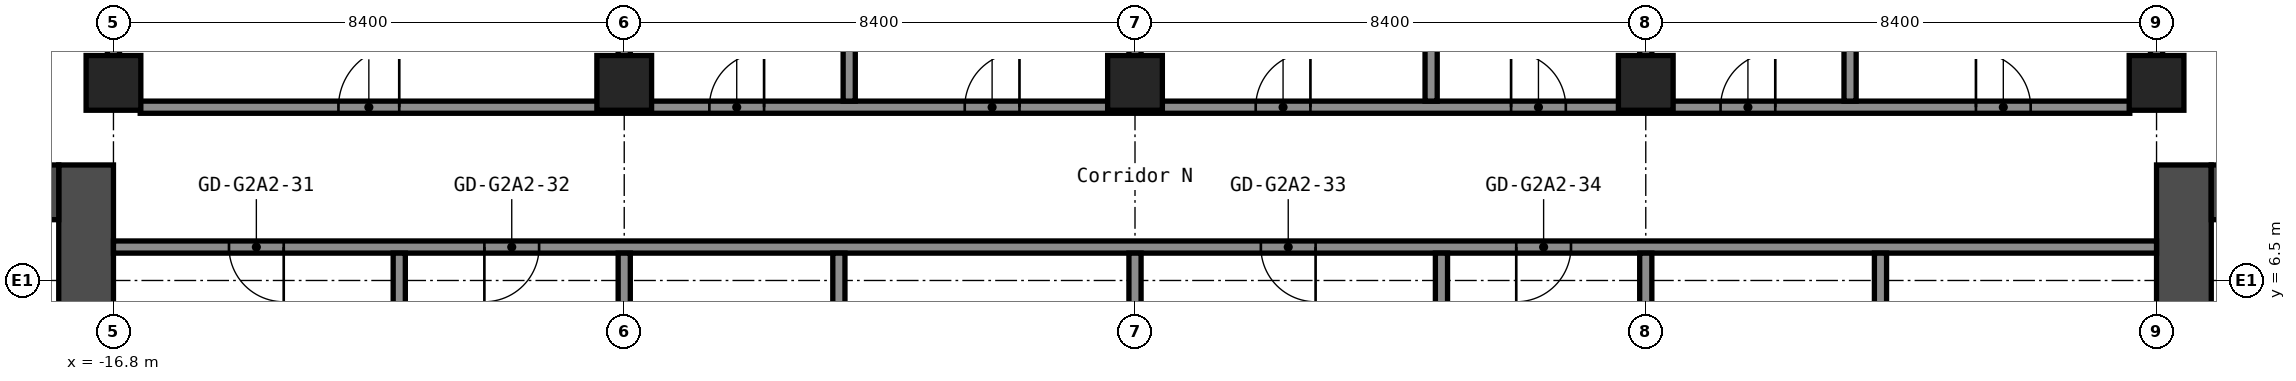
"""IFC4 building model, lengths in metres.
Left out: names, types, materials, properties, quantities, classifications, styles, units other than length and angle.
Written with IfcOpenShell. Run it as: python <this file> out.ifc"""

import sys

from ifc_helpers import new_model, si_unit, direction, frame, frame_2d, origin, origin_2d, place, context, subcontext, project, spatial, rectangle, hollow_rectangle, extrude, element, fill, save


model = new_model("IFC4")
c1 = context("Model", 3, precision=1e-05, world=origin(), true_north=direction((0.0, 1.0)))
c2 = subcontext(c1, "Body", "Model", "MODEL_VIEW")
j1 = project(units=[si_unit("LENGTHUNIT", "METRE"), si_unit("PLANEANGLEUNIT", "RADIAN")], contexts=[c1])
p1 = place(None, origin())
s1 = spatial("IfcSite", under=j1, at=p1, CompositionType="ELEMENT")
p2 = place(p1, origin())
s2 = spatial("IfcBuilding", under=s1, at=p2, CompositionType="ELEMENT")
p3 = place(p2, frame((0.0, 0.0, 107.4)))
s3 = spatial("IfcBuildingStorey", under=s2, at=p3, CompositionType="ELEMENT", Elevation=107.4)
for number, where, z_axis, x_axis in (
    (1, (-16.8, 9.75, 0.0), (0.0, 0.0, 1.0), (1.0, 0.0, 0.0)),
    (2, (-8.4, 9.75, 0.0), (0.0, 0.0, 1.0), (1.0, 0.0, 0.0)),
    (3, (0.0, 9.75, 0.0), (0.0, 0.0, 1.0), (1.0, 0.0, 0.0)),
    (4, (8.4, 9.75, 0.0), (0.0, 0.0, 1.0), (1.0, 0.0, 0.0)),
    (5, (16.8, 9.75, 0.0), (0.0, 0.0, 1.0), (1.0, 0.0, 0.0)),
):
    element("IfcColumn", number, at=place(p3, frame(where, z_axis=z_axis, x_axis=x_axis)), inside=s3, PredefinedType="COLUMN", context=c2, shape_type="SweptSolid", body=[
        extrude(hollow_rectangle(XDim=0.9, YDim=0.9, WallThickness=0.036, at=origin_2d()), origin(), (0.0, 0.0, 1.0), 2.8),
    ])
p4 = place(p3, frame((-17.25, -8.4, 0.0), z_axis=(0.0, 0.0, 1.0), x_axis=(0.0, 1.0, 0.0)))
e6 = element("IfcWall", 6, at=p4, inside=s3, PredefinedType="SHEAR", context=c2, shape_type="SweptSolid", body=[
    extrude(rectangle(XDim=16.8, YDim=0.9, at=frame_2d((8.4, 0.0))), origin(), (0.0, 0.0, 1.0), 2.8),
])
p5 = place(p4, frame((7.6, 0.0, 0.0)))
e7 = element("IfcOpeningElement", 7, at=p5, cuts=e6, PredefinedType="OPENING", context=c2, shape_type="SweptSolid", body=[
    extrude(rectangle(XDim=1.2, YDim=2.1, at=frame_2d((0.6, 1.05))), frame((0.0, 0.46, 0.0), z_axis=(0.0, -1.0, 0.0), x_axis=(1.0, 0.0, 0.0)), (0.0, 0.0, 1.0), 0.92),
])
p6 = place(p3, frame((-32.7, 7.95, 0.0), z_axis=(0.0, 0.0, 1.0), x_axis=(1.0, 0.0, 0.0)))
e8 = element("IfcWall", 8, at=p6, inside=s3, PredefinedType="SHEAR", context=c2, shape_type="SweptSolid", body=[
    extrude(rectangle(XDim=15.0, YDim=0.9, at=frame_2d((7.5, 0.0))), origin(), (0.0, 0.0, 1.0), 2.8),
])
p7 = place(p6, frame((3.4, 0.0, 0.0)))
e9 = element("IfcOpeningElement", 9, at=p7, cuts=e8, PredefinedType="OPENING", context=c2, shape_type="SweptSolid", body=[
    extrude(rectangle(XDim=1.2, YDim=2.1, at=frame_2d((0.6, 1.05))), frame((0.0, 0.46, 0.0), z_axis=(0.0, -1.0, 0.0), x_axis=(1.0, 0.0, 0.0)), (0.0, 0.0, 1.0), 0.92),
])
p8 = place(p6, frame((0.75, 0.0, 0.0)))
e10 = element("IfcOpeningElement", 10, at=p8, cuts=e8, PredefinedType="OPENING", context=c2, shape_type="SweptSolid", body=[
    extrude(rectangle(XDim=0.9, YDim=2.1, at=frame_2d((0.45, 1.05))), frame((0.0, 0.46, 0.0), z_axis=(0.0, -1.0, 0.0), x_axis=(1.0, 0.0, 0.0)), (0.0, 0.0, 1.0), 0.92),
])
p9 = place(p3, frame((17.25, -8.4, 0.0), z_axis=(0.0, 0.0, 1.0), x_axis=(0.0, 1.0, 0.0)))
e11 = element("IfcWall", 11, at=p9, inside=s3, PredefinedType="SHEAR", context=c2, shape_type="SweptSolid", body=[
    extrude(rectangle(XDim=16.8, YDim=0.9, at=frame_2d((8.4, 0.0))), origin(), (0.0, 0.0, 1.0), 2.8),
])
p10 = place(p9, frame((7.6, 0.0, 0.0)))
e12 = element("IfcOpeningElement", 12, at=p10, cuts=e11, PredefinedType="OPENING", context=c2, shape_type="SweptSolid", body=[
    extrude(rectangle(XDim=1.2, YDim=2.1, at=frame_2d((0.6, 1.05))), frame((0.0, 0.46, 0.0), z_axis=(0.0, -1.0, 0.0), x_axis=(1.0, 0.0, 0.0)), (0.0, 0.0, 1.0), 0.92),
])
p11 = place(p3, frame((17.7, 7.95, 0.0), z_axis=(0.0, 0.0, 1.0), x_axis=(1.0, 0.0, 0.0)))
e13 = element("IfcWall", 13, at=p11, inside=s3, PredefinedType="SHEAR", context=c2, shape_type="SweptSolid", body=[
    extrude(rectangle(XDim=15.0, YDim=0.9, at=frame_2d((7.5, 0.0))), origin(), (0.0, 0.0, 1.0), 2.8),
])
p12 = place(p11, frame((10.4, 0.0, 0.0)))
e14 = element("IfcOpeningElement", 14, at=p12, cuts=e13, PredefinedType="OPENING", context=c2, shape_type="SweptSolid", body=[
    extrude(rectangle(XDim=1.2, YDim=2.1, at=frame_2d((0.6, 1.05))), frame((0.0, 0.46, 0.0), z_axis=(0.0, -1.0, 0.0), x_axis=(1.0, 0.0, 0.0)), (0.0, 0.0, 1.0), 0.92),
])
p13 = place(p11, frame((13.35, 0.0, 0.0)))
e15 = element("IfcOpeningElement", 15, at=p13, cuts=e13, PredefinedType="OPENING", context=c2, shape_type="SweptSolid", body=[
    extrude(rectangle(XDim=0.9, YDim=2.1, at=frame_2d((0.45, 1.05))), frame((0.0, 0.46, 0.0), z_axis=(0.0, -1.0, 0.0), x_axis=(1.0, 0.0, 0.0)), (0.0, 0.0, 1.0), 0.92),
])
p14 = place(p3, frame((-16.8, 7.05, 0.0), z_axis=(0.0, 0.0, 1.0), x_axis=(1.0, 0.0, 0.0)))
e16 = element("IfcWall", 16, at=p14, inside=s3, PredefinedType="PARTITIONING", context=c2, shape_type="SweptSolid", body=[
    extrude(rectangle(XDim=33.6, YDim=0.2, at=frame_2d((16.8, 0.0))), origin(), (0.0, 0.0, 1.0), 2.8),
])
p15 = place(p14, frame((1.9, 0.0, 0.0)))
e17 = element("IfcOpeningElement", 17, at=p15, cuts=e16, PredefinedType="OPENING", context=c2, shape_type="SweptSolid", body=[
    extrude(rectangle(XDim=0.9, YDim=2.1, at=frame_2d((0.45, 1.05))), frame((0.0, 0.11, 0.0), z_axis=(0.0, -1.0, 0.0), x_axis=(1.0, 0.0, 0.0)), (0.0, 0.0, 1.0), 0.22),
])
p16 = place(p14, frame((6.1, 0.0, 0.0)))
e18 = element("IfcOpeningElement", 18, at=p16, cuts=e16, PredefinedType="OPENING", context=c2, shape_type="SweptSolid", body=[
    extrude(rectangle(XDim=0.9, YDim=2.1, at=frame_2d((0.45, 1.05))), frame((0.0, 0.11, 0.0), z_axis=(0.0, -1.0, 0.0), x_axis=(1.0, 0.0, 0.0)), (0.0, 0.0, 1.0), 0.22),
])
p17 = place(p14, frame((18.87, 0.0, 0.0)))
e19 = element("IfcOpeningElement", 19, at=p17, cuts=e16, PredefinedType="OPENING", context=c2, shape_type="SweptSolid", body=[
    extrude(rectangle(XDim=0.9, YDim=2.1, at=frame_2d((0.45, 1.05))), frame((0.0, 0.11, 0.0), z_axis=(0.0, -1.0, 0.0), x_axis=(1.0, 0.0, 0.0)), (0.0, 0.0, 1.0), 0.22),
])
p18 = place(p14, frame((23.07, 0.0, 0.0)))
e20 = element("IfcOpeningElement", 20, at=p18, cuts=e16, PredefinedType="OPENING", context=c2, shape_type="SweptSolid", body=[
    extrude(rectangle(XDim=0.9, YDim=2.1, at=frame_2d((0.45, 1.05))), frame((0.0, 0.11, 0.0), z_axis=(0.0, -1.0, 0.0), x_axis=(1.0, 0.0, 0.0)), (0.0, 0.0, 1.0), 0.22),
])
p19 = place(p3, frame((-16.36, 9.35, 0.0), z_axis=(0.0, 0.0, 1.0), x_axis=(1.0, 0.0, 0.0)))
e21 = element("IfcWall", 21, at=p19, inside=s3, PredefinedType="PARTITIONING", context=c2, shape_type="SweptSolid", body=[
    extrude(rectangle(XDim=32.72, YDim=0.2, at=frame_2d((16.36, 0.0))), origin(), (0.0, 0.0, 1.0), 2.8),
])
p20 = place(p19, frame((3.26, 0.0, 0.0)))
e22 = element("IfcOpeningElement", 22, at=p20, cuts=e21, PredefinedType="OPENING", context=c2, shape_type="SweptSolid", body=[
    extrude(rectangle(XDim=1.0, YDim=2.1, at=frame_2d((0.5, 1.05))), frame((0.0, 0.11, 0.0), z_axis=(0.0, -1.0, 0.0), x_axis=(1.0, 0.0, 0.0)), (0.0, 0.0, 1.0), 0.22),
])
p21 = place(p19, frame((9.36, 0.0, 0.0)))
e23 = element("IfcOpeningElement", 23, at=p21, cuts=e21, PredefinedType="OPENING", context=c2, shape_type="SweptSolid", body=[
    extrude(rectangle(XDim=0.9, YDim=2.1, at=frame_2d((0.45, 1.05))), frame((0.0, 0.11, 0.0), z_axis=(0.0, -1.0, 0.0), x_axis=(1.0, 0.0, 0.0)), (0.0, 0.0, 1.0), 0.22),
])
p22 = place(p19, frame((13.56, 0.0, 0.0)))
e24 = element("IfcOpeningElement", 24, at=p22, cuts=e21, PredefinedType="OPENING", context=c2, shape_type="SweptSolid", body=[
    extrude(rectangle(XDim=0.9, YDim=2.1, at=frame_2d((0.45, 1.05))), frame((0.0, 0.11, 0.0), z_axis=(0.0, -1.0, 0.0), x_axis=(1.0, 0.0, 0.0)), (0.0, 0.0, 1.0), 0.22),
])
p23 = place(p19, frame((18.345, 0.0, 0.0)))
e25 = element("IfcOpeningElement", 25, at=p23, cuts=e21, PredefinedType="OPENING", context=c2, shape_type="SweptSolid", body=[
    extrude(rectangle(XDim=0.9, YDim=2.1, at=frame_2d((0.45, 1.05))), frame((0.0, 0.11, 0.0), z_axis=(0.0, -1.0, 0.0), x_axis=(1.0, 0.0, 0.0)), (0.0, 0.0, 1.0), 0.22),
])
p24 = place(p19, frame((22.545, 0.0, 0.0)))
e26 = element("IfcOpeningElement", 26, at=p24, cuts=e21, PredefinedType="OPENING", context=c2, shape_type="SweptSolid", body=[
    extrude(rectangle(XDim=0.9, YDim=2.1, at=frame_2d((0.45, 1.05))), frame((0.0, 0.11, 0.0), z_axis=(0.0, -1.0, 0.0), x_axis=(1.0, 0.0, 0.0)), (0.0, 0.0, 1.0), 0.22),
])
p25 = place(p19, frame((25.99, 0.0, 0.0)))
e27 = element("IfcOpeningElement", 27, at=p25, cuts=e21, PredefinedType="OPENING", context=c2, shape_type="SweptSolid", body=[
    extrude(rectangle(XDim=0.9, YDim=2.1, at=frame_2d((0.45, 1.05))), frame((0.0, 0.11, 0.0), z_axis=(0.0, -1.0, 0.0), x_axis=(1.0, 0.0, 0.0)), (0.0, 0.0, 1.0), 0.22),
])
p26 = place(p19, frame((30.19, 0.0, 0.0)))
e28 = element("IfcOpeningElement", 28, at=p26, cuts=e21, PredefinedType="OPENING", context=c2, shape_type="SweptSolid", body=[
    extrude(rectangle(XDim=0.9, YDim=2.1, at=frame_2d((0.45, 1.05))), frame((0.0, 0.11, 0.0), z_axis=(0.0, -1.0, 0.0), x_axis=(1.0, 0.0, 0.0)), (0.0, 0.0, 1.0), 0.22),
])
p27 = place(p3, frame((-16.8, 10.19, 0.0), z_axis=(0.0, 0.0, 1.0), x_axis=(0.0, 1.0, 0.0)))
e29 = element("IfcWall", 29, at=p27, inside=s3, PredefinedType="PARTITIONING", context=c2, shape_type="SweptSolid", body=[
    extrude(rectangle(XDim=13.36, YDim=0.2, at=frame_2d((6.68, 0.0))), origin(), (0.0, 0.0, 1.0), 2.8),
])
for number, where, z_axis, x_axis in (
    (30, (-12.1, 1.05, 0.0), (0.0, 0.0, 1.0), (0.0, 1.0, 0.0)),
    (31, (-8.4, 1.05, 0.0), (0.0, 0.0, 1.0), (0.0, 1.0, 0.0)),
):
    element("IfcWall", number, at=place(p3, frame(where, z_axis=z_axis, x_axis=x_axis)), inside=s3, PredefinedType="PARTITIONING", context=c2, shape_type="SweptSolid", body=[
        extrude(rectangle(XDim=5.9, YDim=0.2, at=frame_2d((2.95, 0.0))), origin(), (0.0, 0.0, 1.0), 2.8),
    ])
p28 = place(p3, frame((-8.4, 10.19, 0.0), z_axis=(0.0, 0.0, 1.0), x_axis=(0.0, 1.0, 0.0)))
e32 = element("IfcWall", 32, at=p28, inside=s3, PredefinedType="PARTITIONING", context=c2, shape_type="SweptSolid", body=[
    extrude(rectangle(XDim=13.36, YDim=0.2, at=frame_2d((6.68, 0.0))), origin(), (0.0, 0.0, 1.0), 2.8),
])
p29 = place(p3, frame((-4.87, 1.05, 0.0), z_axis=(0.0, 0.0, 1.0), x_axis=(0.0, 1.0, 0.0)))
e33 = element("IfcWall", 33, at=p29, inside=s3, PredefinedType="PARTITIONING", context=c2, shape_type="SweptSolid", body=[
    extrude(rectangle(XDim=5.9, YDim=0.2, at=frame_2d((2.95, 0.0))), origin(), (0.0, 0.0, 1.0), 2.8),
])
p30 = place(p3, frame((-4.7, 9.45, 0.0), z_axis=(0.0, 0.0, 1.0), x_axis=(0.0, 1.0, 0.0)))
e34 = element("IfcWall", 34, at=p30, inside=s3, PredefinedType="PARTITIONING", context=c2, shape_type="SweptSolid", body=[
    extrude(rectangle(XDim=14.1, YDim=0.2, at=frame_2d((7.05, 0.0))), origin(), (0.0, 0.0, 1.0), 2.8),
])
p31 = place(p3, frame((0.0, 1.05, 0.0), z_axis=(0.0, 0.0, 1.0), x_axis=(0.0, 1.0, 0.0)))
e35 = element("IfcWall", 35, at=p31, inside=s3, PredefinedType="PARTITIONING", context=c2, shape_type="SweptSolid", body=[
    extrude(rectangle(XDim=5.9, YDim=0.2, at=frame_2d((2.95, 0.0))), origin(), (0.0, 0.0, 1.0), 2.8),
])
p32 = place(p3, frame((0.0, 10.19, 0.0), z_axis=(0.0, 0.0, 1.0), x_axis=(0.0, 1.0, 0.0)))
e36 = element("IfcWall", 36, at=p32, inside=s3, PredefinedType="PARTITIONING", context=c2, shape_type="SweptSolid", body=[
    extrude(rectangle(XDim=13.36, YDim=0.2, at=frame_2d((6.68, 0.0))), origin(), (0.0, 0.0, 1.0), 2.8),
])
p33 = place(p3, frame((4.87, 9.45, 0.0), z_axis=(0.0, 0.0, 1.0), x_axis=(0.0, 1.0, 0.0)))
e37 = element("IfcWall", 37, at=p33, inside=s3, PredefinedType="PARTITIONING", context=c2, shape_type="SweptSolid", body=[
    extrude(rectangle(XDim=14.1, YDim=0.2, at=frame_2d((7.05, 0.0))), origin(), (0.0, 0.0, 1.0), 2.8),
])
for number, where, z_axis, x_axis in (
    (38, (5.04, 1.05, 0.0), (0.0, 0.0, 1.0), (0.0, 1.0, 0.0)),
    (39, (8.4, 1.05, 0.0), (0.0, 0.0, 1.0), (0.0, 1.0, 0.0)),
):
    element("IfcWall", number, at=place(p3, frame(where, z_axis=z_axis, x_axis=x_axis)), inside=s3, PredefinedType="PARTITIONING", context=c2, shape_type="SweptSolid", body=[
        extrude(rectangle(XDim=5.9, YDim=0.2, at=frame_2d((2.95, 0.0))), origin(), (0.0, 0.0, 1.0), 2.8),
    ])
p34 = place(p3, frame((8.4, 10.19, 0.0), z_axis=(0.0, 0.0, 1.0), x_axis=(0.0, 1.0, 0.0)))
e40 = element("IfcWall", 40, at=p34, inside=s3, PredefinedType="PARTITIONING", context=c2, shape_type="SweptSolid", body=[
    extrude(rectangle(XDim=13.36, YDim=0.2, at=frame_2d((6.68, 0.0))), origin(), (0.0, 0.0, 1.0), 2.8),
])
p35 = place(p3, frame((11.76, 9.45, 0.0), z_axis=(0.0, 0.0, 1.0), x_axis=(0.0, 1.0, 0.0)))
e41 = element("IfcWall", 41, at=p35, inside=s3, PredefinedType="PARTITIONING", context=c2, shape_type="SweptSolid", body=[
    extrude(rectangle(XDim=14.1, YDim=0.2, at=frame_2d((7.05, 0.0))), origin(), (0.0, 0.0, 1.0), 2.8),
])
p36 = place(p3, frame((12.26, 1.05, 0.0), z_axis=(0.0, 0.0, 1.0), x_axis=(0.0, 1.0, 0.0)))
e42 = element("IfcWall", 42, at=p36, inside=s3, PredefinedType="PARTITIONING", context=c2, shape_type="SweptSolid", body=[
    extrude(rectangle(XDim=5.9, YDim=0.2, at=frame_2d((2.95, 0.0))), origin(), (0.0, 0.0, 1.0), 2.8),
])
p37 = place(p3, frame((16.8, 10.19, 0.0), z_axis=(0.0, 0.0, 1.0), x_axis=(0.0, 1.0, 0.0)))
e43 = element("IfcWall", 43, at=p37, inside=s3, PredefinedType="PARTITIONING", context=c2, shape_type="SweptSolid", body=[
    extrude(rectangle(XDim=13.36, YDim=0.2, at=frame_2d((6.68, 0.0))), origin(), (0.0, 0.0, 1.0), 2.8),
])
p38 = place(p15, origin())
e44 = element("IfcDoor", 44, at=p38, inside=s3, OperationType="SINGLE_SWING_RIGHT", PredefinedType="DOOR", context=c2, shape_type="SweptSolid", body=[
    extrude(rectangle(XDim=0.9, YDim=2.1, at=frame_2d((0.45, 1.05))), frame((0.0, 0.025, 0.0), z_axis=(0.0, -1.0, 0.0), x_axis=(1.0, 0.0, 0.0)), (0.0, 0.0, 1.0), 0.05),
])
fill(e17, e44)
p39 = place(p16, origin())
e45 = element("IfcDoor", 45, at=p39, inside=s3, OperationType="SINGLE_SWING_LEFT", PredefinedType="DOOR", context=c2, shape_type="SweptSolid", body=[
    extrude(rectangle(XDim=0.9, YDim=2.1, at=frame_2d((0.45, 1.05))), frame((0.0, 0.025, 0.0), z_axis=(0.0, -1.0, 0.0), x_axis=(1.0, 0.0, 0.0)), (0.0, 0.0, 1.0), 0.05),
])
fill(e18, e45)
p40 = place(p17, origin())
e46 = element("IfcDoor", 46, at=p40, inside=s3, OperationType="SINGLE_SWING_RIGHT", PredefinedType="DOOR", context=c2, shape_type="SweptSolid", body=[
    extrude(rectangle(XDim=0.9, YDim=2.1, at=frame_2d((0.45, 1.05))), frame((0.0, 0.025, 0.0), z_axis=(0.0, -1.0, 0.0), x_axis=(1.0, 0.0, 0.0)), (0.0, 0.0, 1.0), 0.05),
])
fill(e19, e46)
p41 = place(p18, origin())
e47 = element("IfcDoor", 47, at=p41, inside=s3, OperationType="SINGLE_SWING_LEFT", PredefinedType="DOOR", context=c2, shape_type="SweptSolid", body=[
    extrude(rectangle(XDim=0.9, YDim=2.1, at=frame_2d((0.45, 1.05))), frame((0.0, 0.025, 0.0), z_axis=(0.0, -1.0, 0.0), x_axis=(1.0, 0.0, 0.0)), (0.0, 0.0, 1.0), 0.05),
])
fill(e20, e47)
p42 = place(p20, origin())
e48 = element("IfcDoor", 48, at=p42, inside=s3, OperationType="SINGLE_SWING_LEFT", PredefinedType="DOOR", context=c2, shape_type="SweptSolid", body=[
    extrude(rectangle(XDim=1.0, YDim=2.1, at=frame_2d((0.5, 1.05))), frame((0.0, 0.025, 0.0), z_axis=(0.0, -1.0, 0.0), x_axis=(1.0, 0.0, 0.0)), (0.0, 0.0, 1.0), 0.05),
])
fill(e22, e48)
p43 = place(p21, origin())
e49 = element("IfcDoor", 49, at=p43, inside=s3, OperationType="SINGLE_SWING_LEFT", PredefinedType="DOOR", context=c2, shape_type="SweptSolid", body=[
    extrude(rectangle(XDim=0.9, YDim=2.1, at=frame_2d((0.45, 1.05))), frame((0.0, 0.025, 0.0), z_axis=(0.0, -1.0, 0.0), x_axis=(1.0, 0.0, 0.0)), (0.0, 0.0, 1.0), 0.05),
])
fill(e23, e49)
p44 = place(p22, origin())
e50 = element("IfcDoor", 50, at=p44, inside=s3, OperationType="SINGLE_SWING_LEFT", PredefinedType="DOOR", context=c2, shape_type="SweptSolid", body=[
    extrude(rectangle(XDim=0.9, YDim=2.1, at=frame_2d((0.45, 1.05))), frame((0.0, 0.025, 0.0), z_axis=(0.0, -1.0, 0.0), x_axis=(1.0, 0.0, 0.0)), (0.0, 0.0, 1.0), 0.05),
])
fill(e24, e50)
p45 = place(p23, origin())
e51 = element("IfcDoor", 51, at=p45, inside=s3, OperationType="SINGLE_SWING_LEFT", PredefinedType="DOOR", context=c2, shape_type="SweptSolid", body=[
    extrude(rectangle(XDim=0.9, YDim=2.1, at=frame_2d((0.45, 1.05))), frame((0.0, 0.025, 0.0), z_axis=(0.0, -1.0, 0.0), x_axis=(1.0, 0.0, 0.0)), (0.0, 0.0, 1.0), 0.05),
])
fill(e25, e51)
p46 = place(p24, origin())
e52 = element("IfcDoor", 52, at=p46, inside=s3, OperationType="SINGLE_SWING_RIGHT", PredefinedType="DOOR", context=c2, shape_type="SweptSolid", body=[
    extrude(rectangle(XDim=0.9, YDim=2.1, at=frame_2d((0.45, 1.05))), frame((0.0, 0.025, 0.0), z_axis=(0.0, -1.0, 0.0), x_axis=(1.0, 0.0, 0.0)), (0.0, 0.0, 1.0), 0.05),
])
fill(e26, e52)
p47 = place(p25, origin())
e53 = element("IfcDoor", 53, at=p47, inside=s3, OperationType="SINGLE_SWING_LEFT", PredefinedType="DOOR", context=c2, shape_type="SweptSolid", body=[
    extrude(rectangle(XDim=0.9, YDim=2.1, at=frame_2d((0.45, 1.05))), frame((0.0, 0.025, 0.0), z_axis=(0.0, -1.0, 0.0), x_axis=(1.0, 0.0, 0.0)), (0.0, 0.0, 1.0), 0.05),
])
fill(e27, e53)
p48 = place(p26, origin())
e54 = element("IfcDoor", 54, at=p48, inside=s3, OperationType="SINGLE_SWING_RIGHT", PredefinedType="DOOR", context=c2, shape_type="SweptSolid", body=[
    extrude(rectangle(XDim=0.9, YDim=2.1, at=frame_2d((0.45, 1.05))), frame((0.0, 0.025, 0.0), z_axis=(0.0, -1.0, 0.0), x_axis=(1.0, 0.0, 0.0)), (0.0, 0.0, 1.0), 0.05),
])
fill(e28, e54)
save(model, sys.argv[1])
